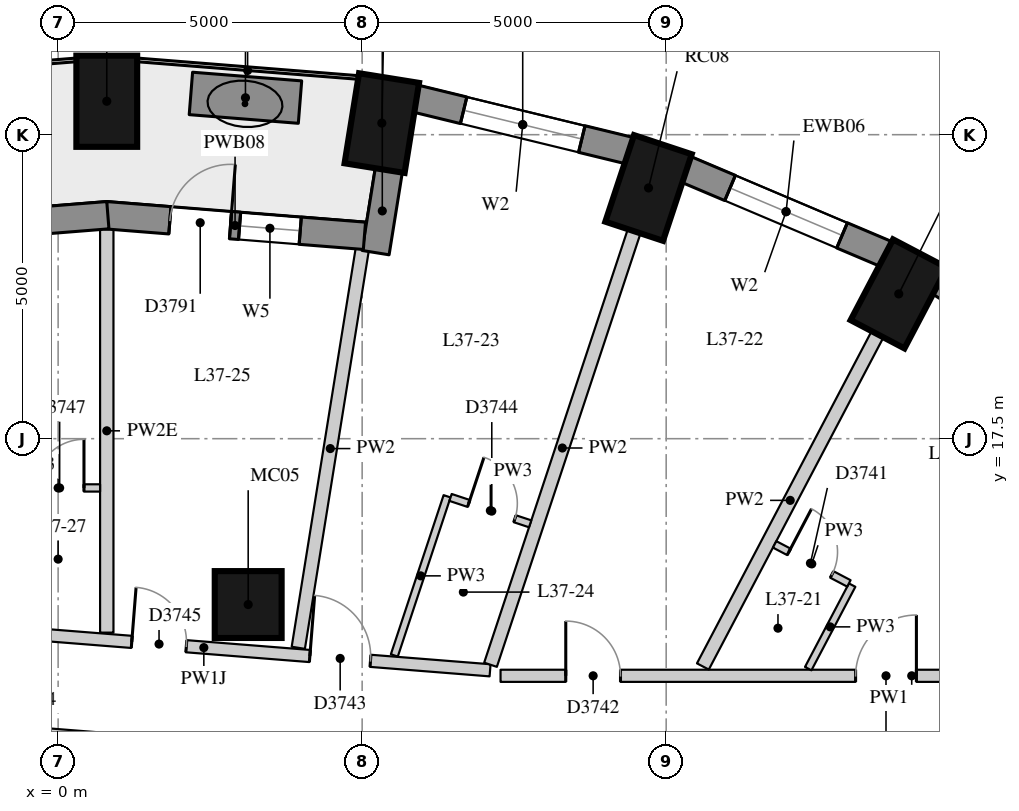
"""IFC4 building model, lengths in metres.
Left out: names, types, materials, properties, quantities, classifications, styles, units other than length and angle.
Written with IfcOpenShell. Run it as: python <this file> out.ifc"""

import sys

from ifc_helpers import new_model, si_unit, direction, frame, frame_2d, origin, origin_2d, place, context, subcontext, project, spatial, rectangle, extrude, element, fill, save


model = new_model("IFC4")
c1 = context("Model", 3, precision=1e-05, world=origin(), true_north=direction((0.0, 1.0)))
c2 = subcontext(c1, "Body", "Model", "MODEL_VIEW")
j1 = project(units=[si_unit("LENGTHUNIT", "METRE"), si_unit("PLANEANGLEUNIT", "RADIAN")], contexts=[c1])
p1 = place(None, origin())
s1 = spatial("IfcSite", under=j1, at=p1, CompositionType="ELEMENT")
p2 = place(p1, origin())
s2 = spatial("IfcBuilding", under=s1, at=p2, CompositionType="ELEMENT")
p3 = place(p2, frame((0.0, 0.0, 131.8)))
s3 = spatial("IfcBuildingStorey", under=s2, at=p3, CompositionType="ELEMENT", Elevation=131.8)
for number, where, z_axis, x_axis in (
    (1, (13.825, 19.882, 0.0), (0.0, 0.0, 1.0), (0.465, 0.885, 0.0)),
    (2, (9.71, 21.624, 0.0), (0.0, 0.0, 1.0), (0.315, 0.949, 0.0)),
    (3, (5.323, 22.691, 0.0), (0.0, 0.0, 1.0), (0.159, 0.987, 0.0)),
    (4, (0.8, 23.05, 0.0), (0.0, 0.0, 1.0), (0.0, 1.0, 0.0)),
):
    element("IfcColumn", number, at=place(p3, frame(where, z_axis=z_axis, x_axis=x_axis)), inside=s3, PredefinedType="COLUMN", context=c2, shape_type="SweptSolid", body=[
        extrude(rectangle(XDim=1.5, YDim=1.0, at=origin_2d()), origin(), (0.0, 0.0, 1.0), 3.3),
    ])
p4 = place(p3, frame((3.126, 14.772, 0.0), z_axis=(0.0, 0.0, 1.0), x_axis=(1.0, 0.0, 0.0)))
e5 = element("IfcColumn", 5, at=p4, inside=s3, PredefinedType="COLUMN", context=c2, shape_type="SweptSolid", body=[
    extrude(rectangle(XDim=1.1, YDim=1.1, at=origin_2d()), origin(), (0.0, 0.0, 1.0), 3.3),
])
p5 = place(p3, frame((17.456, 18.192, 0.0), z_axis=(0.0, 0.0, 1.0), x_axis=(-0.843880549131, 0.536531097699, 0.0)))
e6 = element("IfcWall", 6, at=p5, inside=s3, PredefinedType="SOLIDWALL", context=c2, shape_type="SweptSolid", body=[
    extrude(rectangle(XDim=3.532, YDim=0.45, at=frame_2d((1.766, 0.0))), origin(), (0.0, 0.0, 1.0), 2.85),
])
p6 = place(p5, frame((0.766, 0.0, 0.4)))
e7 = element("IfcOpeningElement", 7, at=p6, cuts=e6, PredefinedType="OPENING", context=c2, shape_type="SweptSolid", body=[
    extrude(rectangle(XDim=2.0, YDim=1.75, at=frame_2d((1.0, 0.875))), frame((0.0, 0.235, 0.0), z_axis=(0.0, -1.0, 0.0), x_axis=(1.0, 0.0, 0.0)), (0.0, 0.0, 1.0), 0.47),
])
p7 = place(p3, frame((13.625, 20.533, 0.0), z_axis=(0.0, 0.0, 1.0), x_axis=(-0.920869643542, 0.389870619055, 0.0)))
e8 = element("IfcWall", 8, at=p7, inside=s3, PredefinedType="SOLIDWALL", context=c2, shape_type="SweptSolid", body=[
    extrude(rectangle(XDim=3.591, YDim=0.45, at=frame_2d((1.796, 0.0))), origin(), (0.0, 0.0, 1.0), 2.85),
])
p8 = place(p7, frame((0.796, 0.0, 0.4)))
e9 = element("IfcOpeningElement", 9, at=p8, cuts=e8, PredefinedType="OPENING", context=c2, shape_type="SweptSolid", body=[
    extrude(rectangle(XDim=2.0, YDim=1.75, at=frame_2d((1.0, 0.875))), frame((0.0, 0.235, 0.0), z_axis=(0.0, -1.0, 0.0), x_axis=(1.0, 0.0, 0.0)), (0.0, 0.0, 1.0), 0.47),
])
p9 = place(p3, frame((9.406, 22.235, 0.0), z_axis=(0.0, 0.0, 1.0), x_axis=(-0.971667603162, 0.236351579148, 0.0)))
e10 = element("IfcWall", 10, at=p9, inside=s3, PredefinedType="SOLIDWALL", context=c2, shape_type="SweptSolid", body=[
    extrude(rectangle(XDim=3.635, YDim=0.45, at=frame_2d((1.817, 0.0))), origin(), (0.0, 0.0, 1.0), 2.85),
])
p10 = place(p9, frame((0.817, 0.0, 0.4)))
e11 = element("IfcOpeningElement", 11, at=p10, cuts=e10, PredefinedType="OPENING", context=c2, shape_type="SweptSolid", body=[
    extrude(rectangle(XDim=2.0, YDim=1.75, at=frame_2d((1.0, 0.875))), frame((0.0, 0.235, 0.0), z_axis=(0.0, -1.0, 0.0), x_axis=(1.0, 0.0, 0.0)), (0.0, 0.0, 1.0), 0.47),
])
p11 = place(p3, frame((5.441, 21.932, 0.0), z_axis=(0.0, 0.0, 1.0), x_axis=(-0.158586380547, -0.987345106792, 0.0)))
e12 = element("IfcWall", 12, at=p11, inside=s3, PredefinedType="SOLIDWALL", context=c2, shape_type="SweptSolid", body=[
    extrude(rectangle(XDim=1.39, YDim=0.45, at=frame_2d((0.695, 0.0))), origin(), (0.0, 0.0, 1.0), 2.85),
])
p12 = place(p3, frame((5.038, 20.837, 0.0), z_axis=(0.0, 0.0, 1.0), x_axis=(-0.996839780714, 0.079438350855, 0.0)))
e13 = element("IfcWall", 13, at=p12, inside=s3, PredefinedType="SOLIDWALL", context=c2, shape_type="SweptSolid", body=[
    extrude(rectangle(XDim=4.269, YDim=0.45, at=frame_2d((2.134, 0.0))), origin(), (0.0, 0.0, 1.0), 2.85),
])
p13 = place(p12, frame((1.06, 0.0, 0.4)))
e14 = element("IfcOpeningElement", 14, at=p13, cuts=e13, PredefinedType="OPENING", context=c2, shape_type="SweptSolid", body=[
    extrude(rectangle(XDim=1.0, YDim=1.75, at=frame_2d((0.5, 0.875))), frame((0.0, 0.235, 0.0), z_axis=(0.0, -1.0, 0.0), x_axis=(1.0, 0.0, 0.0)), (0.0, 0.0, 1.0), 0.47),
])
p14 = place(p12, frame((2.209, 0.0, 0.0)))
e15 = element("IfcOpeningElement", 15, at=p14, cuts=e13, PredefinedType="OPENING", context=c2, shape_type="SweptSolid", body=[
    extrude(rectangle(XDim=1.0, YDim=2.15, at=frame_2d((0.5, 1.075))), frame((0.0, 0.235, 0.0), z_axis=(0.0, -1.0, 0.0), x_axis=(1.0, 0.0, 0.0)), (0.0, 0.0, 1.0), 0.47),
])
p15 = place(p3, frame((0.818, 21.176, 0.0), z_axis=(0.0, 0.0, 1.0), x_axis=(-0.996843824935, -0.079387585235, 0.0)))
e16 = element("IfcWall", 16, at=p15, inside=s3, PredefinedType="SOLIDWALL", context=c2, shape_type="SweptSolid", body=[
    extrude(rectangle(XDim=4.287, YDim=0.45, at=frame_2d((2.144, 0.0))), origin(), (0.0, 0.0, 1.0), 2.85),
])
p16 = place(p15, frame((1.068, 0.0, 0.4)))
e17 = element("IfcOpeningElement", 17, at=p16, cuts=e16, PredefinedType="OPENING", context=c2, shape_type="SweptSolid", body=[
    extrude(rectangle(XDim=1.0, YDim=1.75, at=frame_2d((0.5, 0.875))), frame((0.0, 0.235, 0.0), z_axis=(0.0, -1.0, 0.0), x_axis=(1.0, 0.0, 0.0)), (0.0, 0.0, 1.0), 0.47),
])
p17 = place(p15, frame((2.219, 0.0, 0.0)))
e18 = element("IfcOpeningElement", 18, at=p17, cuts=e16, PredefinedType="OPENING", context=c2, shape_type="SweptSolid", body=[
    extrude(rectangle(XDim=1.0, YDim=2.15, at=frame_2d((0.5, 1.075))), frame((0.0, 0.235, 0.0), z_axis=(0.0, -1.0, 0.0), x_axis=(1.0, 0.0, 0.0)), (0.0, 0.0, 1.0), 0.47),
])
p18 = place(p3, frame((3.978, 23.036, 0.0), z_axis=(0.0, 0.0, 1.0), x_axis=(-0.996858257414, 0.079206152698, 0.0)))
e19 = element("IfcWall", 19, at=p18, inside=s3, PredefinedType="USERDEFINED", context=c2, shape_type="SweptSolid", body=[
    extrude(rectangle(XDim=1.8, YDim=0.7, at=frame_2d((0.9, 0.0))), origin(), (0.0, 0.0, 1.0), 0.75),
])
p19 = place(p3, frame((-2.311, 14.437, 0.0), z_axis=(0.0, 0.0, 1.0), x_axis=(0.996870762165, -0.079048615048, 0.0)))
e20 = element("IfcWall", 20, at=p19, inside=s3, PredefinedType="PARTITIONING", context=c2, shape_type="SweptSolid", body=[
    extrude(rectangle(XDim=9.445, YDim=0.2, at=frame_2d((4.722, 0.0))), origin(), (0.0, 0.0, 1.0), 2.25),
])
p20 = place(p19, frame((6.471, 0.0, 0.0)))
e21 = element("IfcOpeningElement", 21, at=p20, cuts=e20, PredefinedType="OPENING", context=c2, shape_type="SweptSolid", body=[
    extrude(rectangle(XDim=1.0, YDim=2.1, at=frame_2d((0.5, 1.05))), frame((0.0, 0.11, 0.0), z_axis=(0.0, -1.0, 0.0), x_axis=(1.0, 0.0, 0.0)), (0.0, 0.0, 1.0), 0.22),
])
p21 = place(p19, frame((3.533, 0.0, 0.0)))
e22 = element("IfcOpeningElement", 22, at=p21, cuts=e20, PredefinedType="OPENING", context=c2, shape_type="SweptSolid", body=[
    extrude(rectangle(XDim=0.9, YDim=2.1, at=frame_2d((0.45, 1.05))), frame((0.0, 0.11, 0.0), z_axis=(0.0, -1.0, 0.0), x_axis=(1.0, 0.0, 0.0)), (0.0, 0.0, 1.0), 0.22),
])
p22 = place(p19, frame((0.22, 0.0, 0.0)))
e23 = element("IfcOpeningElement", 23, at=p22, cuts=e20, PredefinedType="OPENING", context=c2, shape_type="SweptSolid", body=[
    extrude(rectangle(XDim=1.0, YDim=2.1, at=frame_2d((0.5, 1.05))), frame((0.0, 0.11, 0.0), z_axis=(0.0, -1.0, 0.0), x_axis=(1.0, 0.0, 0.0)), (0.0, 0.0, 1.0), 0.22),
])
p23 = place(p3, frame((7.276, 13.6, 0.0), z_axis=(0.0, 0.0, 1.0), x_axis=(1.0, 0.0, 0.0)))
e24 = element("IfcWall", 24, at=p23, inside=s3, PredefinedType="PARTITIONING", context=c2, shape_type="SweptSolid", body=[
    extrude(rectangle(XDim=13.524, YDim=0.2, at=frame_2d((6.762, 0.0))), origin(), (0.0, 0.0, 1.0), 2.85),
])
p24 = place(p23, frame((5.839, 0.0, 0.0)))
e25 = element("IfcOpeningElement", 25, at=p24, cuts=e24, PredefinedType="OPENING", context=c2, shape_type="SweptSolid", body=[
    extrude(rectangle(XDim=1.0, YDim=2.1, at=frame_2d((0.5, 1.05))), frame((0.0, 0.11, 0.0), z_axis=(0.0, -1.0, 0.0), x_axis=(1.0, 0.0, 0.0)), (0.0, 0.0, 1.0), 0.22),
])
p25 = place(p23, frame((1.073, 0.0, 0.0)))
e26 = element("IfcOpeningElement", 26, at=p25, cuts=e24, PredefinedType="OPENING", context=c2, shape_type="SweptSolid", body=[
    extrude(rectangle(XDim=0.9, YDim=2.1, at=frame_2d((0.45, 1.05))), frame((0.0, 0.11, 0.0), z_axis=(0.0, -1.0, 0.0), x_axis=(1.0, 0.0, 0.0)), (0.0, 0.0, 1.0), 0.22),
])
p26 = place(p23, frame((9.494, 0.0, 0.0)))
e27 = element("IfcOpeningElement", 27, at=p26, cuts=e24, PredefinedType="OPENING", context=c2, shape_type="SweptSolid", body=[
    extrude(rectangle(XDim=1.8, YDim=2.1, at=frame_2d((0.9, 1.05))), frame((0.0, 0.11, 0.0), z_axis=(0.0, -1.0, 0.0), x_axis=(1.0, 0.0, 0.0)), (0.0, 0.0, 1.0), 0.22),
])
p27 = place(p3, frame((-2.109, 12.816, 0.0), z_axis=(0.0, 0.0, 1.0), x_axis=(0.996868431192, -0.079078005119, 0.0)))
e28 = element("IfcWall", 28, at=p27, inside=s3, PredefinedType="PARTITIONING", context=c2, shape_type="SweptSolid", body=[
    extrude(rectangle(XDim=3.52, YDim=0.15, at=frame_2d((1.76, 0.0))), origin(), (0.0, 0.0, 1.0), 2.85),
])
p28 = place(p3, frame((13.476, 19.218, 0.0), z_axis=(0.0, 0.0, 1.0), x_axis=(-0.465345394262, -0.885129179295, 0.0)))
e29 = element("IfcWall", 29, at=p28, inside=s3, PredefinedType="PARTITIONING", context=c2, shape_type="SweptSolid", body=[
    extrude(rectangle(XDim=6.173, YDim=0.22, at=frame_2d((3.086, 0.0))), origin(), (0.0, 0.0, 1.0), 2.85),
])
p29 = place(p3, frame((9.474, 20.912, 0.0), z_axis=(0.0, 0.0, 1.0), x_axis=(-0.314530608669, -0.949247331421, 0.0)))
e30 = element("IfcWall", 30, at=p29, inside=s3, PredefinedType="PARTITIONING", context=c2, shape_type="SweptSolid", body=[
    extrude(rectangle(XDim=7.511, YDim=0.22, at=frame_2d((3.756, 0.0))), origin(), (0.0, 0.0, 1.0), 2.85),
])
p30 = place(p3, frame((5.002, 20.614, 0.0), z_axis=(0.0, 0.0, 1.0), x_axis=(-0.158502645231, -0.987358552632, 0.0)))
e31 = element("IfcWall", 31, at=p30, inside=s3, PredefinedType="PARTITIONING", context=c2, shape_type="SweptSolid", body=[
    extrude(rectangle(XDim=6.637, YDim=0.22, at=frame_2d((3.319, 0.0))), origin(), (0.0, 0.0, 1.0), 2.85),
])
p31 = place(p3, frame((0.8, 20.948, 0.0), z_axis=(0.0, 0.0, 1.0), x_axis=(0.0, -1.0, 0.0)))
e32 = element("IfcWall", 32, at=p31, inside=s3, PredefinedType="PARTITIONING", context=c2, shape_type="SweptSolid", body=[
    extrude(rectangle(XDim=6.638, YDim=0.22, at=frame_2d((3.319, 0.0))), origin(), (0.0, 0.0, 1.0), 2.4),
])
p32 = place(p3, frame((12.336, 13.718, 0.0), z_axis=(0.0, 0.0, 1.0), x_axis=(0.465428746876, 0.88508535271, 0.0)))
e33 = element("IfcWall", 33, at=p32, inside=s3, PredefinedType="PARTITIONING", context=c2, shape_type="SweptSolid", body=[
    extrude(rectangle(XDim=1.552, YDim=0.12, at=frame_2d((0.776, 0.0))), origin(), (0.0, 0.0, 1.0), 2.85),
])
p33 = place(p3, frame((5.529, 13.935, 0.0), z_axis=(0.0, 0.0, 1.0), x_axis=(0.31455402028, 0.949239573725, 0.0)))
e34 = element("IfcWall", 34, at=p33, inside=s3, PredefinedType="PARTITIONING", context=c2, shape_type="SweptSolid", body=[
    extrude(rectangle(XDim=2.758, YDim=0.12, at=frame_2d((1.379, 0.0))), origin(), (0.0, 0.0, 1.0), 2.85),
])
p34 = place(p3, frame((13.005, 15.12, 0.0), z_axis=(0.0, 0.0, 1.0), x_axis=(-0.885148383454, 0.465308864378, 0.0)))
e35 = element("IfcWall", 35, at=p34, inside=s3, PredefinedType="PARTITIONING", context=c2, shape_type="SweptSolid", body=[
    extrude(rectangle(XDim=1.38, YDim=0.12, at=frame_2d((0.69, 0.0))), origin(), (0.0, 0.0, 1.0), 2.85),
])
p35 = place(p34, frame((0.315, 0.0, 0.0)))
e36 = element("IfcOpeningElement", 36, at=p35, cuts=e35, PredefinedType="OPENING", context=c2, shape_type="SweptSolid", body=[
    extrude(rectangle(XDim=0.8, YDim=2.1, at=frame_2d((0.4, 1.05))), frame((0.0, 0.07, 0.0), z_axis=(0.0, -1.0, 0.0), x_axis=(1.0, 0.0, 0.0)), (0.0, 0.0, 1.0), 0.14),
])
p36 = place(p3, frame((6.454, 16.534, 0.0), z_axis=(0.0, 0.0, 1.0), x_axis=(0.949265680417, -0.314475226342, 0.0)))
e37 = element("IfcWall", 37, at=p36, inside=s3, PredefinedType="PARTITIONING", context=c2, shape_type="SweptSolid", body=[
    extrude(rectangle(XDim=1.38, YDim=0.12, at=frame_2d((0.69, 0.0))), origin(), (0.0, 0.0, 1.0), 2.85),
])
p37 = place(p36, frame((0.315, 0.0, 0.0)))
e38 = element("IfcOpeningElement", 38, at=p37, cuts=e37, PredefinedType="OPENING", context=c2, shape_type="SweptSolid", body=[
    extrude(rectangle(XDim=0.8, YDim=2.1, at=frame_2d((0.4, 1.05))), frame((0.0, 0.07, 0.0), z_axis=(0.0, -1.0, 0.0), x_axis=(1.0, 0.0, 0.0)), (0.0, 0.0, 1.0), 0.14),
])
p38 = place(p3, frame((-0.69, 16.69, 0.0), z_axis=(0.0, 0.0, 1.0), x_axis=(1.0, 0.0, 0.0)))
e39 = element("IfcWall", 39, at=p38, inside=s3, PredefinedType="PARTITIONING", context=c2, shape_type="SweptSolid", body=[
    extrude(rectangle(XDim=1.38, YDim=0.12, at=frame_2d((0.69, 0.0))), origin(), (0.0, 0.0, 1.0), 2.85),
])
p39 = place(p38, frame((0.315, 0.0, 0.0)))
e40 = element("IfcOpeningElement", 40, at=p39, cuts=e39, PredefinedType="OPENING", context=c2, shape_type="SweptSolid", body=[
    extrude(rectangle(XDim=0.8, YDim=2.1, at=frame_2d((0.4, 1.05))), frame((0.0, 0.07, 0.0), z_axis=(0.0, -1.0, 0.0), x_axis=(1.0, 0.0, 0.0)), (0.0, 0.0, 1.0), 0.14),
])
p40 = place(p8, origin())
e41 = element("IfcWindow", 41, at=p40, inside=s3, PartitioningType="SINGLE_PANEL", PredefinedType="WINDOW", context=c2, shape_type="SweptSolid", body=[
    extrude(rectangle(XDim=2.0, YDim=1.75, at=frame_2d((1.0, 0.875))), frame((0.0, 0.035, 0.0), z_axis=(0.0, -1.0, 0.0), x_axis=(1.0, 0.0, 0.0)), (0.0, 0.0, 1.0), 0.06),
])
fill(e9, e41)
p41 = place(p10, origin())
e42 = element("IfcWindow", 42, at=p41, inside=s3, PartitioningType="SINGLE_PANEL", PredefinedType="WINDOW", context=c2, shape_type="SweptSolid", body=[
    extrude(rectangle(XDim=2.0, YDim=1.75, at=frame_2d((1.0, 0.875))), frame((0.0, 0.035, 0.0), z_axis=(0.0, -1.0, 0.0), x_axis=(1.0, 0.0, 0.0)), (0.0, 0.0, 1.0), 0.06),
])
fill(e11, e42)
p42 = place(p13, origin())
e43 = element("IfcWindow", 43, at=p42, inside=s3, PartitioningType="SINGLE_PANEL", PredefinedType="WINDOW", context=c2, shape_type="SweptSolid", body=[
    extrude(rectangle(XDim=1.0, YDim=1.75, at=frame_2d((0.5, 0.875))), frame((0.0, 0.035, 0.0), z_axis=(0.0, -1.0, 0.0), x_axis=(1.0, 0.0, 0.0)), (0.0, 0.0, 1.0), 0.06),
])
fill(e14, e43)
p43 = place(p14, frame((1.0, 0.0, 0.0), z_axis=(0.0, 0.0, 1.0), x_axis=(-1.0, 0.0, 0.0)))
e44 = element("IfcDoor", 44, at=p43, inside=s3, OperationType="SINGLE_SWING_RIGHT", PredefinedType="DOOR", context=c2, shape_type="SweptSolid", body=[
    extrude(rectangle(XDim=1.0, YDim=2.15, at=frame_2d((0.5, 1.075))), frame((0.0, 0.075, 0.0), z_axis=(0.0, -1.0, 0.0), x_axis=(1.0, 0.0, 0.0)), (0.0, 0.0, 1.0), 0.05),
])
fill(e15, e44)
p44 = place(p24, origin())
e45 = element("IfcDoor", 45, at=p44, inside=s3, OperationType="SINGLE_SWING_RIGHT", PredefinedType="DOOR", context=c2, shape_type="SweptSolid", body=[
    extrude(rectangle(XDim=1.0, YDim=2.1, at=frame_2d((0.5, 1.05))), frame((0.0, 0.025, 0.0), z_axis=(0.0, -1.0, 0.0), x_axis=(1.0, 0.0, 0.0)), (0.0, 0.0, 1.0), 0.05),
])
fill(e25, e45)
p45 = place(p35, origin())
e46 = element("IfcDoor", 46, at=p45, inside=s3, OperationType="SINGLE_SWING_LEFT", PredefinedType="DOOR", context=c2, shape_type="SweptSolid", body=[
    extrude(rectangle(XDim=0.8, YDim=2.1, at=frame_2d((0.4, 1.05))), frame((0.0, 0.025, 0.0), z_axis=(0.0, -1.0, 0.0), x_axis=(1.0, 0.0, 0.0)), (0.0, 0.0, 1.0), 0.05),
])
fill(e36, e46)
p46 = place(p25, origin())
e47 = element("IfcDoor", 47, at=p46, inside=s3, OperationType="SINGLE_SWING_LEFT", PredefinedType="DOOR", context=c2, shape_type="SweptSolid", body=[
    extrude(rectangle(XDim=0.9, YDim=2.1, at=frame_2d((0.45, 1.05))), frame((0.0, 0.025, 0.0), z_axis=(0.0, -1.0, 0.0), x_axis=(1.0, 0.0, 0.0)), (0.0, 0.0, 1.0), 0.05),
])
fill(e26, e47)
p47 = place(p20, origin())
e48 = element("IfcDoor", 48, at=p47, inside=s3, OperationType="SINGLE_SWING_LEFT", PredefinedType="DOOR", context=c2, shape_type="SweptSolid", body=[
    extrude(rectangle(XDim=1.0, YDim=2.1, at=frame_2d((0.5, 1.05))), frame((0.0, 0.025, 0.0), z_axis=(0.0, -1.0, 0.0), x_axis=(1.0, 0.0, 0.0)), (0.0, 0.0, 1.0), 0.05),
])
fill(e21, e48)
p48 = place(p37, origin())
e49 = element("IfcDoor", 49, at=p48, inside=s3, OperationType="SINGLE_SWING_LEFT", PredefinedType="DOOR", context=c2, shape_type="SweptSolid", body=[
    extrude(rectangle(XDim=0.8, YDim=2.1, at=frame_2d((0.4, 1.05))), frame((0.0, 0.025, 0.0), z_axis=(0.0, -1.0, 0.0), x_axis=(1.0, 0.0, 0.0)), (0.0, 0.0, 1.0), 0.05),
])
fill(e38, e49)
p49 = place(p21, origin())
e50 = element("IfcDoor", 50, at=p49, inside=s3, OperationType="SINGLE_SWING_LEFT", PredefinedType="DOOR", context=c2, shape_type="SweptSolid", body=[
    extrude(rectangle(XDim=0.9, YDim=2.1, at=frame_2d((0.45, 1.05))), frame((0.0, 0.025, 0.0), z_axis=(0.0, -1.0, 0.0), x_axis=(1.0, 0.0, 0.0)), (0.0, 0.0, 1.0), 0.05),
])
fill(e22, e50)
p50 = place(p39, origin())
e51 = element("IfcDoor", 51, at=p50, inside=s3, OperationType="SINGLE_SWING_RIGHT", PredefinedType="DOOR", context=c2, shape_type="SweptSolid", body=[
    extrude(rectangle(XDim=0.8, YDim=2.1, at=frame_2d((0.4, 1.05))), frame((0.0, 0.025, 0.0), z_axis=(0.0, -1.0, 0.0), x_axis=(1.0, 0.0, 0.0)), (0.0, 0.0, 1.0), 0.05),
])
fill(e40, e51)
save(model, sys.argv[1])
